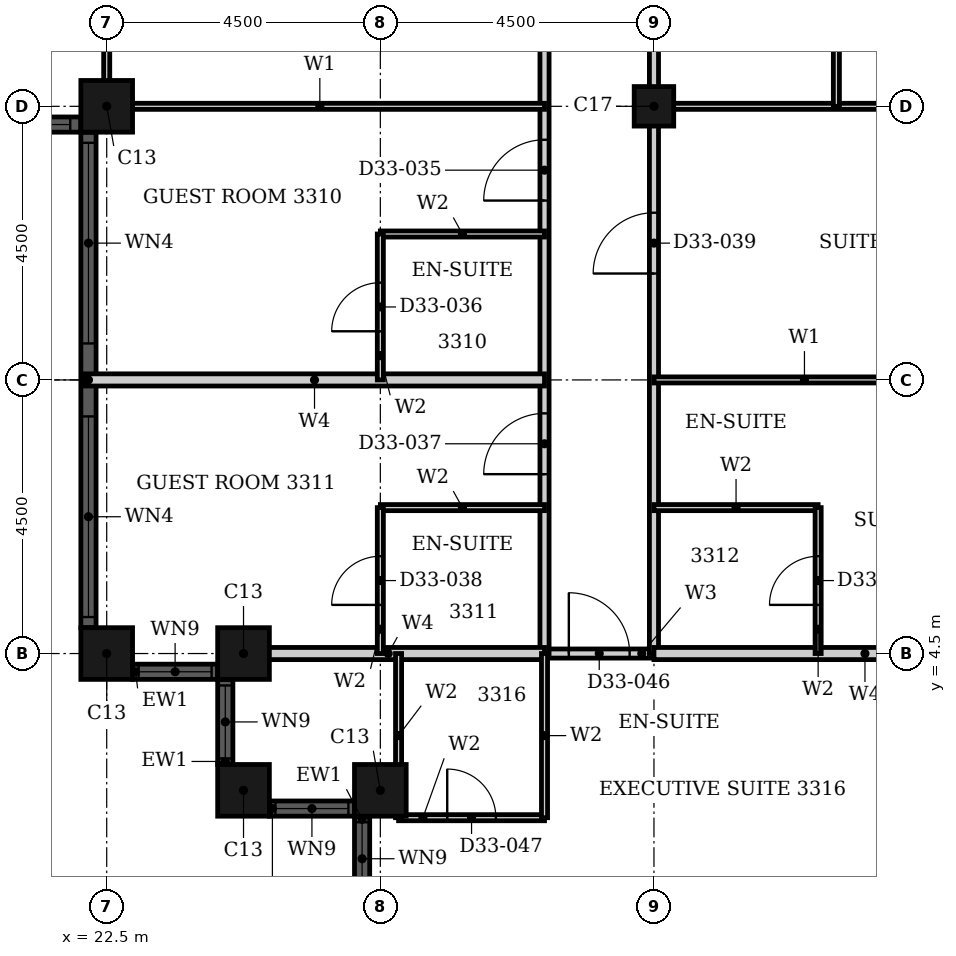
"""IFC4 building model, lengths in metres.
Left out: names, types, materials, properties, quantities, classifications, styles, units other than length and angle.
Written with IfcOpenShell. Run it as: python <this file> out.ifc"""

import sys

from ifc_helpers import new_model, si_unit, direction, frame, frame_2d, origin, origin_2d, place, context, subcontext, project, spatial, rectangle, hollow_rectangle, extrude, element, fill, save


model = new_model("IFC4")
c1 = context("Model", 3, precision=1e-05, world=origin(), true_north=direction((0.0, 1.0)))
c2 = subcontext(c1, "Body", "Model", "MODEL_VIEW")
j1 = project(units=[si_unit("LENGTHUNIT", "METRE"), si_unit("PLANEANGLEUNIT", "RADIAN")], contexts=[c1])
p1 = place(None, origin())
s1 = spatial("IfcSite", under=j1, at=p1, CompositionType="ELEMENT")
p2 = place(p1, origin())
s2 = spatial("IfcBuilding", under=s1, at=p2, CompositionType="ELEMENT")
p3 = place(p2, frame((0.0, 0.0, 133.2)))
s3 = spatial("IfcBuildingStorey", under=s2, at=p3, CompositionType="ELEMENT", Elevation=133.2)
for number, where, z_axis, x_axis in (
    (1, (22.5, 4.5, 0.0), (0.0, 0.0, 1.0), (1.0, 0.0, 0.0)),
    (2, (24.75, 4.5, 0.0), (0.0, 0.0, 1.0), (1.0, 0.0, 0.0)),
    (3, (24.75, 2.25, 0.0), (0.0, 0.0, 1.0), (1.0, 0.0, 0.0)),
    (4, (27.0, 2.25, 0.0), (0.0, 0.0, 1.0), (1.0, 0.0, 0.0)),
    (5, (22.5, 13.5, 0.0), (0.0, 0.0, 1.0), (1.0, 0.0, 0.0)),
):
    element("IfcColumn", number, at=place(p3, frame(where, z_axis=z_axis, x_axis=x_axis)), inside=s3, PredefinedType="COLUMN", context=c2, shape_type="SweptSolid", body=[
        extrude(hollow_rectangle(XDim=0.85, YDim=0.85, WallThickness=0.026, at=origin_2d()), origin(), (0.0, 0.0, 1.0), 3.6),
    ])
p4 = place(p3, frame((31.5, 13.5, 0.0), z_axis=(0.0, 0.0, 1.0), x_axis=(1.0, 0.0, 0.0)))
e6 = element("IfcColumn", 6, at=p4, inside=s3, PredefinedType="COLUMN", context=c2, shape_type="SweptSolid", body=[
    extrude(hollow_rectangle(XDim=0.65, YDim=0.65, WallThickness=0.021, at=origin_2d()), origin(), (0.0, 0.0, 1.0), 3.6),
])
p5 = place(p3, frame((22.925, 4.2, 0.0), z_axis=(0.0, 0.0, 1.0), x_axis=(1.0, 0.0, 0.0)))
e7 = element("IfcWall", 7, at=p5, inside=s3, PredefinedType="SOLIDWALL", context=c2, shape_type="SweptSolid", body=[
    extrude(rectangle(XDim=1.4, YDim=0.25, at=frame_2d((0.7, 0.0))), origin(), (0.0, 0.0, 1.0), 3.6),
])
p6 = place(p5, frame((0.1, 0.0, 0.9)))
e8 = element("IfcOpeningElement", 8, at=p6, cuts=e7, PredefinedType="OPENING", context=c2, shape_type="SweptSolid", body=[
    extrude(rectangle(XDim=1.2, YDim=2.08, at=frame_2d((0.6, 1.04))), frame((0.0, 0.135, 0.0), z_axis=(0.0, -1.0, 0.0), x_axis=(1.0, 0.0, 0.0)), (0.0, 0.0, 1.0), 0.27),
])
p7 = place(p3, frame((24.45, 4.075, 0.0), z_axis=(0.0, 0.0, 1.0), x_axis=(0.0, -1.0, 0.0)))
e9 = element("IfcWall", 9, at=p7, inside=s3, PredefinedType="SOLIDWALL", context=c2, shape_type="SweptSolid", body=[
    extrude(rectangle(XDim=1.4, YDim=0.25, at=frame_2d((0.7, 0.0))), origin(), (0.0, 0.0, 1.0), 3.6),
])
p8 = place(p7, frame((0.1, 0.0, 0.9)))
e10 = element("IfcOpeningElement", 10, at=p8, cuts=e9, PredefinedType="OPENING", context=c2, shape_type="SweptSolid", body=[
    extrude(rectangle(XDim=1.2, YDim=2.08, at=frame_2d((0.6, 1.04))), frame((0.0, 0.135, 0.0), z_axis=(0.0, -1.0, 0.0), x_axis=(1.0, 0.0, 0.0)), (0.0, 0.0, 1.0), 0.27),
])
p9 = place(p3, frame((25.175, 1.95, 0.0), z_axis=(0.0, 0.0, 1.0), x_axis=(1.0, 0.0, 0.0)))
e11 = element("IfcWall", 11, at=p9, inside=s3, PredefinedType="SOLIDWALL", context=c2, shape_type="SweptSolid", body=[
    extrude(rectangle(XDim=1.4, YDim=0.25, at=frame_2d((0.7, 0.0))), origin(), (0.0, 0.0, 1.0), 3.6),
])
p10 = place(p9, frame((0.1, 0.0, 0.9)))
e12 = element("IfcOpeningElement", 12, at=p10, cuts=e11, PredefinedType="OPENING", context=c2, shape_type="SweptSolid", body=[
    extrude(rectangle(XDim=1.2, YDim=2.08, at=frame_2d((0.6, 1.04))), frame((0.0, 0.135, 0.0), z_axis=(0.0, -1.0, 0.0), x_axis=(1.0, 0.0, 0.0)), (0.0, 0.0, 1.0), 0.27),
])
p11 = place(p3, frame((26.7, 1.825, 0.0), z_axis=(0.0, 0.0, 1.0), x_axis=(0.0, -1.0, 0.0)))
e13 = element("IfcWall", 13, at=p11, inside=s3, PredefinedType="SOLIDWALL", context=c2, shape_type="SweptSolid", body=[
    extrude(rectangle(XDim=1.4, YDim=0.25, at=frame_2d((0.7, 0.0))), origin(), (0.0, 0.0, 1.0), 3.6),
])
p12 = place(p11, frame((0.1, 0.0, 0.9)))
e14 = element("IfcOpeningElement", 14, at=p12, cuts=e13, PredefinedType="OPENING", context=c2, shape_type="SweptSolid", body=[
    extrude(rectangle(XDim=1.2, YDim=2.08, at=frame_2d((0.6, 1.04))), frame((0.0, 0.135, 0.0), z_axis=(0.0, -1.0, 0.0), x_axis=(1.0, 0.0, 0.0)), (0.0, 0.0, 1.0), 0.27),
])
p13 = place(p3, frame((18.425, 13.2, 0.0), z_axis=(0.0, 0.0, 1.0), x_axis=(1.0, 0.0, 0.0)))
e15 = element("IfcWall", 15, at=p13, inside=s3, PredefinedType="SOLIDWALL", context=c2, shape_type="SweptSolid", body=[
    extrude(rectangle(XDim=3.65, YDim=0.25, at=frame_2d((1.825, 0.0))), origin(), (0.0, 0.0, 1.0), 3.6),
])
p14 = place(p13, frame((0.175, 0.0, 0.9)))
e16 = element("IfcOpeningElement", 16, at=p14, cuts=e15, PredefinedType="OPENING", context=c2, shape_type="SweptSolid", body=[
    extrude(rectangle(XDim=3.3, YDim=2.08, at=frame_2d((1.65, 1.04))), frame((0.0, 0.135, 0.0), z_axis=(0.0, -1.0, 0.0), x_axis=(1.0, 0.0, 0.0)), (0.0, 0.0, 1.0), 0.27),
])
p15 = place(p3, frame((22.2, 13.075, 0.0), z_axis=(0.0, 0.0, 1.0), x_axis=(0.0, -1.0, 0.0)))
e17 = element("IfcWall", 17, at=p15, inside=s3, PredefinedType="SOLIDWALL", context=c2, shape_type="SweptSolid", body=[
    extrude(rectangle(XDim=8.15, YDim=0.25, at=frame_2d((4.075, 0.0))), origin(), (0.0, 0.0, 1.0), 3.6),
])
p16 = place(p15, frame((0.175, 0.0, 0.9)))
e18 = element("IfcOpeningElement", 18, at=p16, cuts=e17, PredefinedType="OPENING", context=c2, shape_type="SweptSolid", body=[
    extrude(rectangle(XDim=3.3, YDim=2.08, at=frame_2d((1.65, 1.04))), frame((0.0, 0.135, 0.0), z_axis=(0.0, -1.0, 0.0), x_axis=(1.0, 0.0, 0.0)), (0.0, 0.0, 1.0), 0.27),
])
p17 = place(p15, frame((4.675, 0.0, 0.9)))
e19 = element("IfcOpeningElement", 19, at=p17, cuts=e17, PredefinedType="OPENING", context=c2, shape_type="SweptSolid", body=[
    extrude(rectangle(XDim=3.3, YDim=2.08, at=frame_2d((1.65, 1.04))), frame((0.0, 0.135, 0.0), z_axis=(0.0, -1.0, 0.0), x_axis=(1.0, 0.0, 0.0)), (0.0, 0.0, 1.0), 0.27),
])
p18 = place(p3, frame((29.7, 4.5, 0.0), z_axis=(0.0, 0.0, 1.0), x_axis=(1.0, 0.0, 0.0)))
e20 = element("IfcWall", 20, at=p18, inside=s3, PredefinedType="PARTITIONING", context=c2, shape_type="SweptSolid", body=[
    extrude(rectangle(XDim=1.8, YDim=0.15, at=frame_2d((0.9, 0.0))), origin(), (0.0, 0.0, 1.0), 3.3),
])
p19 = place(p18, frame((0.4, 0.0, 0.0)))
e21 = element("IfcOpeningElement", 21, at=p19, cuts=e20, PredefinedType="OPENING", context=c2, shape_type="SweptSolid", body=[
    extrude(rectangle(XDim=1.0, YDim=2.1, at=frame_2d((0.5, 1.05))), frame((0.0, 0.085, 0.0), z_axis=(0.0, -1.0, 0.0), x_axis=(1.0, 0.0, 0.0)), (0.0, 0.0, 1.0), 0.17),
])
p20 = place(p3, frame((29.7, 4.5, 0.0), z_axis=(0.0, 0.0, 1.0), x_axis=(0.0, 1.0, 0.0)))
e22 = element("IfcWall", 22, at=p20, inside=s3, PredefinedType="PARTITIONING", context=c2, shape_type="SweptSolid", body=[
    extrude(rectangle(XDim=16.2, YDim=0.15, at=frame_2d((8.1, 0.0))), origin(), (0.0, 0.0, 1.0), 3.3),
])
p21 = place(p20, frame((7.45, 0.0, 0.0)))
e23 = element("IfcOpeningElement", 23, at=p21, cuts=e22, PredefinedType="OPENING", context=c2, shape_type="SweptSolid", body=[
    extrude(rectangle(XDim=1.0, YDim=2.1, at=frame_2d((0.5, 1.05))), frame((0.0, 0.085, 0.0), z_axis=(0.0, -1.0, 0.0), x_axis=(1.0, 0.0, 0.0)), (0.0, 0.0, 1.0), 0.17),
])
p22 = place(p20, frame((2.95, 0.0, 0.0)))
e24 = element("IfcOpeningElement", 24, at=p22, cuts=e22, PredefinedType="OPENING", context=c2, shape_type="SweptSolid", body=[
    extrude(rectangle(XDim=1.0, YDim=2.1, at=frame_2d((0.5, 1.05))), frame((0.0, 0.085, 0.0), z_axis=(0.0, -1.0, 0.0), x_axis=(1.0, 0.0, 0.0)), (0.0, 0.0, 1.0), 0.17),
])
p23 = place(p3, frame((31.5, 4.5, 0.0), z_axis=(0.0, 0.0, 1.0), x_axis=(0.0, 1.0, 0.0)))
e25 = element("IfcWall", 25, at=p23, inside=s3, PredefinedType="PARTITIONING", context=c2, shape_type="SweptSolid", body=[
    extrude(rectangle(XDim=16.2, YDim=0.15, at=frame_2d((8.1, 0.0))), origin(), (0.0, 0.0, 1.0), 2.58),
])
p24 = place(p23, frame((6.25, 0.0, 0.0)))
e26 = element("IfcOpeningElement", 26, at=p24, cuts=e25, PredefinedType="OPENING", context=c2, shape_type="SweptSolid", body=[
    extrude(rectangle(XDim=1.0, YDim=2.1, at=frame_2d((0.5, 1.05))), frame((0.0, 0.085, 0.0), z_axis=(0.0, -1.0, 0.0), x_axis=(1.0, 0.0, 0.0)), (0.0, 0.0, 1.0), 0.17),
])
p25 = place(p3, frame((22.31, 13.5, 0.0), z_axis=(0.0, 0.0, 1.0), x_axis=(1.0, 0.0, 0.0)))
e27 = element("IfcWall", 27, at=p25, inside=s3, PredefinedType="PARTITIONING", context=c2, shape_type="SweptSolid", body=[
    extrude(rectangle(XDim=7.39, YDim=0.1, at=frame_2d((3.695, 0.0))), origin(), (0.0, 0.0, 1.0), 2.38),
])
p26 = place(p3, frame((31.5, 13.5, 0.0), z_axis=(0.0, 0.0, 1.0), x_axis=(1.0, 0.0, 0.0)))
e28 = element("IfcWall", 28, at=p26, inside=s3, PredefinedType="PARTITIONING", context=c2, shape_type="SweptSolid", body=[
    extrude(rectangle(XDim=9.19, YDim=0.1, at=frame_2d((4.595, 0.0))), origin(), (0.0, 0.0, 1.0), 2.38),
])
p27 = place(p3, frame((31.5, 9.0, 0.0), z_axis=(0.0, 0.0, 1.0), x_axis=(1.0, 0.0, 0.0)))
e29 = element("IfcWall", 29, at=p27, inside=s3, PredefinedType="PARTITIONING", context=c2, shape_type="SweptSolid", body=[
    extrude(rectangle(XDim=9.365, YDim=0.1, at=frame_2d((4.683, 0.0))), origin(), (0.0, 0.0, 1.0), 3.3),
])
p28 = place(p27, frame((4.95, 0.0, 0.0)))
e30 = element("IfcOpeningElement", 30, at=p28, cuts=e29, PredefinedType="OPENING", context=c2, shape_type="SweptSolid", body=[
    extrude(rectangle(XDim=0.9, YDim=2.1, at=frame_2d((0.45, 1.05))), frame((0.0, 0.06, 0.0), z_axis=(0.0, -1.0, 0.0), x_axis=(1.0, 0.0, 0.0)), (0.0, 0.0, 1.0), 0.12),
])
p29 = place(p3, frame((22.5, 13.31, 0.0), z_axis=(0.0, 0.0, 1.0), x_axis=(0.0, 1.0, 0.0)))
e31 = element("IfcWall", 31, at=p29, inside=s3, PredefinedType="PARTITIONING", context=c2, shape_type="SweptSolid", body=[
    extrude(rectangle(XDim=7.39, YDim=0.1, at=frame_2d((3.695, 0.0))), origin(), (0.0, 0.0, 1.0), 3.3),
])
p30 = place(p3, frame((34.5, 13.5, 0.0), z_axis=(0.0, 0.0, 1.0), x_axis=(0.0, 1.0, 0.0)))
e32 = element("IfcWall", 32, at=p30, inside=s3, PredefinedType="PARTITIONING", context=c2, shape_type="SweptSolid", body=[
    extrude(rectangle(XDim=7.2, YDim=0.1, at=frame_2d((3.6, 0.0))), origin(), (0.0, 0.0, 1.0), 3.3),
])
p31 = place(p3, frame((24.56, 4.5, 0.0), z_axis=(0.0, 0.0, 1.0), x_axis=(1.0, 0.0, 0.0)))
e33 = element("IfcWall", 33, at=p31, inside=s3, PredefinedType="PARTITIONING", context=c2, shape_type="SweptSolid", body=[
    extrude(rectangle(XDim=5.14, YDim=0.2, at=frame_2d((2.57, 0.0))), origin(), (0.0, 0.0, 1.0), 3.3),
])
p32 = place(p3, frame((31.5, 4.5, 0.0), z_axis=(0.0, 0.0, 1.0), x_axis=(1.0, 0.0, 0.0)))
e34 = element("IfcWall", 34, at=p32, inside=s3, PredefinedType="PARTITIONING", context=c2, shape_type="SweptSolid", body=[
    extrude(rectangle(XDim=6.94, YDim=0.2, at=frame_2d((3.47, 0.0))), origin(), (0.0, 0.0, 1.0), 3.3),
])
p33 = place(p3, frame((22.135, 9.0, 0.0), z_axis=(0.0, 0.0, 1.0), x_axis=(1.0, 0.0, 0.0)))
e35 = element("IfcWall", 35, at=p33, inside=s3, PredefinedType="PARTITIONING", context=c2, shape_type="SweptSolid", body=[
    extrude(rectangle(XDim=7.565, YDim=0.2, at=frame_2d((3.782, 0.0))), origin(), (0.0, 0.0, 1.0), 3.3),
])
p34 = place(p3, frame((27.3, 1.8, 0.0), z_axis=(0.0, 0.0, 1.0), x_axis=(1.0, 0.0, 0.0)))
e36 = element("IfcWall", 36, at=p34, inside=s3, PredefinedType="PARTITIONING", context=c2, shape_type="SweptSolid", body=[
    extrude(rectangle(XDim=2.4, YDim=0.1, at=frame_2d((1.2, 0.0))), origin(), (0.0, 0.0, 1.0), 3.3),
])
p35 = place(p34, frame((0.8, 0.0, 0.0)))
e37 = element("IfcOpeningElement", 37, at=p35, cuts=e36, PredefinedType="OPENING", context=c2, shape_type="SweptSolid", body=[
    extrude(rectangle(XDim=0.8, YDim=2.1, at=frame_2d((0.4, 1.05))), frame((0.0, 0.06, 0.0), z_axis=(0.0, -1.0, 0.0), x_axis=(1.0, 0.0, 0.0)), (0.0, 0.0, 1.0), 0.12),
])
for number, where, z_axis, x_axis in (
    (38, (27.0, 11.4, 0.0), (0.0, 0.0, 1.0), (1.0, 0.0, 0.0)),
    (39, (27.0, 6.9, 0.0), (0.0, 0.0, 1.0), (1.0, 0.0, 0.0)),
    (40, (31.5, 6.9, 0.0), (0.0, 0.0, 1.0), (1.0, 0.0, 0.0)),
):
    element("IfcWall", number, at=place(p3, frame(where, z_axis=z_axis, x_axis=x_axis)), inside=s3, PredefinedType="PARTITIONING", context=c2, shape_type="SweptSolid", body=[
        extrude(rectangle(XDim=2.7, YDim=0.1, at=frame_2d((1.35, 0.0))), origin(), (0.0, 0.0, 1.0), 3.3),
    ])
p36 = place(p3, frame((27.0, 9.0, 0.0), z_axis=(0.0, 0.0, 1.0), x_axis=(0.0, 1.0, 0.0)))
e41 = element("IfcWall", 41, at=p36, inside=s3, PredefinedType="PARTITIONING", context=c2, shape_type="SweptSolid", body=[
    extrude(rectangle(XDim=2.4, YDim=0.1, at=frame_2d((1.2, 0.0))), origin(), (0.0, 0.0, 1.0), 2.58),
])
p37 = place(p36, frame((0.8, 0.0, 0.0)))
e42 = element("IfcOpeningElement", 42, at=p37, cuts=e41, PredefinedType="OPENING", context=c2, shape_type="SweptSolid", body=[
    extrude(rectangle(XDim=0.8, YDim=2.1, at=frame_2d((0.4, 1.05))), frame((0.0, 0.06, 0.0), z_axis=(0.0, -1.0, 0.0), x_axis=(1.0, 0.0, 0.0)), (0.0, 0.0, 1.0), 0.12),
])
p38 = place(p3, frame((27.0, 4.5, 0.0), z_axis=(0.0, 0.0, 1.0), x_axis=(0.0, 1.0, 0.0)))
e43 = element("IfcWall", 43, at=p38, inside=s3, PredefinedType="PARTITIONING", context=c2, shape_type="SweptSolid", body=[
    extrude(rectangle(XDim=2.4, YDim=0.1, at=frame_2d((1.2, 0.0))), origin(), (0.0, 0.0, 1.0), 2.58),
])
p39 = place(p38, frame((0.8, 0.0, 0.0)))
e44 = element("IfcOpeningElement", 44, at=p39, cuts=e43, PredefinedType="OPENING", context=c2, shape_type="SweptSolid", body=[
    extrude(rectangle(XDim=0.8, YDim=2.1, at=frame_2d((0.4, 1.05))), frame((0.0, 0.06, 0.0), z_axis=(0.0, -1.0, 0.0), x_axis=(1.0, 0.0, 0.0)), (0.0, 0.0, 1.0), 0.12),
])
for number, where, z_axis, x_axis in (
    (45, (27.3, 1.8, 0.0), (0.0, 0.0, 1.0), (0.0, 1.0, 0.0)),
    (46, (29.7, 1.8, 0.0), (0.0, 0.0, 1.0), (0.0, 1.0, 0.0)),
):
    element("IfcWall", number, at=place(p3, frame(where, z_axis=z_axis, x_axis=x_axis)), inside=s3, PredefinedType="PARTITIONING", context=c2, shape_type="SweptSolid", body=[
        extrude(rectangle(XDim=2.7, YDim=0.1, at=frame_2d((1.35, 0.0))), origin(), (0.0, 0.0, 1.0), 3.3),
    ])
p40 = place(p3, frame((34.2, 4.5, 0.0), z_axis=(0.0, 0.0, 1.0), x_axis=(0.0, 1.0, 0.0)))
e47 = element("IfcWall", 47, at=p40, inside=s3, PredefinedType="PARTITIONING", context=c2, shape_type="SweptSolid", body=[
    extrude(rectangle(XDim=2.4, YDim=0.1, at=frame_2d((1.2, 0.0))), origin(), (0.0, 0.0, 1.0), 3.3),
])
p41 = place(p40, frame((0.8, 0.0, 0.0)))
e48 = element("IfcOpeningElement", 48, at=p41, cuts=e47, PredefinedType="OPENING", context=c2, shape_type="SweptSolid", body=[
    extrude(rectangle(XDim=0.8, YDim=2.1, at=frame_2d((0.4, 1.05))), frame((0.0, 0.06, 0.0), z_axis=(0.0, -1.0, 0.0), x_axis=(1.0, 0.0, 0.0)), (0.0, 0.0, 1.0), 0.12),
])
p42 = place(p6, origin())
e49 = element("IfcWindow", 49, at=p42, inside=s3, PartitioningType="SINGLE_PANEL", PredefinedType="WINDOW", context=c2, shape_type="SweptSolid", body=[
    extrude(rectangle(XDim=1.2, YDim=2.08, at=frame_2d((0.6, 1.04))), frame((0.0, 0.03, 0.0), z_axis=(0.0, -1.0, 0.0), x_axis=(1.0, 0.0, 0.0)), (0.0, 0.0, 1.0), 0.06),
])
fill(e8, e49)
p43 = place(p8, origin())
e50 = element("IfcWindow", 50, at=p43, inside=s3, PartitioningType="SINGLE_PANEL", PredefinedType="WINDOW", context=c2, shape_type="SweptSolid", body=[
    extrude(rectangle(XDim=1.2, YDim=2.08, at=frame_2d((0.6, 1.04))), frame((0.0, 0.03, 0.0), z_axis=(0.0, -1.0, 0.0), x_axis=(1.0, 0.0, 0.0)), (0.0, 0.0, 1.0), 0.06),
])
fill(e10, e50)
p44 = place(p10, origin())
e51 = element("IfcWindow", 51, at=p44, inside=s3, PartitioningType="SINGLE_PANEL", PredefinedType="WINDOW", context=c2, shape_type="SweptSolid", body=[
    extrude(rectangle(XDim=1.2, YDim=2.08, at=frame_2d((0.6, 1.04))), frame((0.0, 0.03, 0.0), z_axis=(0.0, -1.0, 0.0), x_axis=(1.0, 0.0, 0.0)), (0.0, 0.0, 1.0), 0.06),
])
fill(e12, e51)
p45 = place(p12, origin())
e52 = element("IfcWindow", 52, at=p45, inside=s3, PartitioningType="SINGLE_PANEL", PredefinedType="WINDOW", context=c2, shape_type="SweptSolid", body=[
    extrude(rectangle(XDim=1.2, YDim=2.08, at=frame_2d((0.6, 1.04))), frame((0.0, 0.03, 0.0), z_axis=(0.0, -1.0, 0.0), x_axis=(1.0, 0.0, 0.0)), (0.0, 0.0, 1.0), 0.06),
])
fill(e14, e52)
p46 = place(p14, origin())
e53 = element("IfcWindow", 53, at=p46, inside=s3, PartitioningType="SINGLE_PANEL", PredefinedType="WINDOW", context=c2, shape_type="SweptSolid", body=[
    extrude(rectangle(XDim=3.3, YDim=2.08, at=frame_2d((1.65, 1.04))), frame((0.0, 0.03, 0.0), z_axis=(0.0, -1.0, 0.0), x_axis=(1.0, 0.0, 0.0)), (0.0, 0.0, 1.0), 0.06),
])
fill(e16, e53)
p47 = place(p16, origin())
e54 = element("IfcWindow", 54, at=p47, inside=s3, PartitioningType="SINGLE_PANEL", PredefinedType="WINDOW", context=c2, shape_type="SweptSolid", body=[
    extrude(rectangle(XDim=3.3, YDim=2.08, at=frame_2d((1.65, 1.04))), frame((0.0, 0.03, 0.0), z_axis=(0.0, -1.0, 0.0), x_axis=(1.0, 0.0, 0.0)), (0.0, 0.0, 1.0), 0.06),
])
fill(e18, e54)
p48 = place(p17, origin())
e55 = element("IfcWindow", 55, at=p48, inside=s3, PartitioningType="SINGLE_PANEL", PredefinedType="WINDOW", context=c2, shape_type="SweptSolid", body=[
    extrude(rectangle(XDim=3.3, YDim=2.08, at=frame_2d((1.65, 1.04))), frame((0.0, 0.03, 0.0), z_axis=(0.0, -1.0, 0.0), x_axis=(1.0, 0.0, 0.0)), (0.0, 0.0, 1.0), 0.06),
])
fill(e19, e55)
p49 = place(p21, origin())
e56 = element("IfcDoor", 56, at=p49, inside=s3, OperationType="SINGLE_SWING_RIGHT", PredefinedType="DOOR", context=c2, shape_type="SweptSolid", body=[
    extrude(rectangle(XDim=1.0, YDim=2.1, at=frame_2d((0.5, 1.05))), frame((0.0, 0.025, 0.0), z_axis=(0.0, -1.0, 0.0), x_axis=(1.0, 0.0, 0.0)), (0.0, 0.0, 1.0), 0.05),
])
fill(e23, e56)
p50 = place(p37, origin())
e57 = element("IfcDoor", 57, at=p50, inside=s3, OperationType="SINGLE_SWING_LEFT", PredefinedType="DOOR", context=c2, shape_type="SweptSolid", body=[
    extrude(rectangle(XDim=0.8, YDim=2.1, at=frame_2d((0.4, 1.05))), frame((0.0, 0.025, 0.0), z_axis=(0.0, -1.0, 0.0), x_axis=(1.0, 0.0, 0.0)), (0.0, 0.0, 1.0), 0.05),
])
fill(e42, e57)
p51 = place(p22, origin())
e58 = element("IfcDoor", 58, at=p51, inside=s3, OperationType="SINGLE_SWING_RIGHT", PredefinedType="DOOR", context=c2, shape_type="SweptSolid", body=[
    extrude(rectangle(XDim=1.0, YDim=2.1, at=frame_2d((0.5, 1.05))), frame((0.0, 0.025, 0.0), z_axis=(0.0, -1.0, 0.0), x_axis=(1.0, 0.0, 0.0)), (0.0, 0.0, 1.0), 0.05),
])
fill(e24, e58)
p52 = place(p39, origin())
e59 = element("IfcDoor", 59, at=p52, inside=s3, OperationType="SINGLE_SWING_RIGHT", PredefinedType="DOOR", context=c2, shape_type="SweptSolid", body=[
    extrude(rectangle(XDim=0.8, YDim=2.1, at=frame_2d((0.4, 1.05))), frame((0.0, 0.025, 0.0), z_axis=(0.0, -1.0, 0.0), x_axis=(1.0, 0.0, 0.0)), (0.0, 0.0, 1.0), 0.05),
])
fill(e44, e59)
p53 = place(p24, origin())
e60 = element("IfcDoor", 60, at=p53, inside=s3, OperationType="SINGLE_SWING_LEFT", PredefinedType="DOOR", context=c2, shape_type="SweptSolid", body=[
    extrude(rectangle(XDim=1.0, YDim=2.1, at=frame_2d((0.5, 1.05))), frame((0.0, 0.025, 0.0), z_axis=(0.0, -1.0, 0.0), x_axis=(1.0, 0.0, 0.0)), (0.0, 0.0, 1.0), 0.05),
])
fill(e26, e60)
p54 = place(p41, origin())
e61 = element("IfcDoor", 61, at=p54, inside=s3, OperationType="SINGLE_SWING_RIGHT", PredefinedType="DOOR", context=c2, shape_type="SweptSolid", body=[
    extrude(rectangle(XDim=0.8, YDim=2.1, at=frame_2d((0.4, 1.05))), frame((0.0, 0.025, 0.0), z_axis=(0.0, -1.0, 0.0), x_axis=(1.0, 0.0, 0.0)), (0.0, 0.0, 1.0), 0.05),
])
fill(e48, e61)
p55 = place(p19, origin())
e62 = element("IfcDoor", 62, at=p55, inside=s3, OperationType="SINGLE_SWING_LEFT", PredefinedType="DOOR", context=c2, shape_type="SweptSolid", body=[
    extrude(rectangle(XDim=1.0, YDim=2.1, at=frame_2d((0.5, 1.05))), frame((0.0, 0.025, 0.0), z_axis=(0.0, -1.0, 0.0), x_axis=(1.0, 0.0, 0.0)), (0.0, 0.0, 1.0), 0.05),
])
fill(e21, e62)
p56 = place(p35, origin())
e63 = element("IfcDoor", 63, at=p56, inside=s3, OperationType="SINGLE_SWING_RIGHT", PredefinedType="DOOR", context=c2, shape_type="SweptSolid", body=[
    extrude(rectangle(XDim=0.8, YDim=2.1, at=frame_2d((0.4, 1.05))), frame((0.0, 0.025, 0.0), z_axis=(0.0, -1.0, 0.0), x_axis=(1.0, 0.0, 0.0)), (0.0, 0.0, 1.0), 0.05),
])
fill(e37, e63)
save(model, sys.argv[1])
